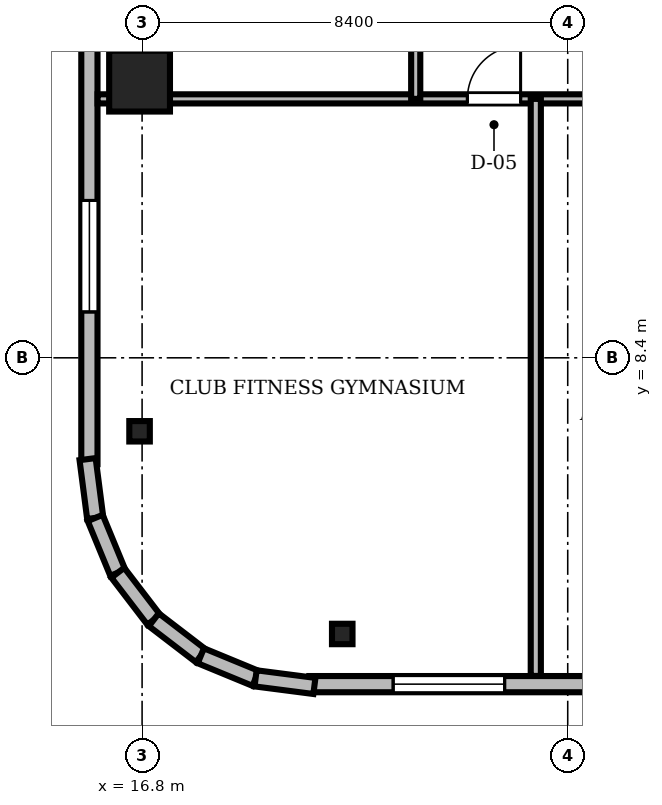
"""IFC4 building model, lengths in metres.
Left out: names, types, materials, properties, quantities, classifications, styles, units other than length and angle.
Written with IfcOpenShell. Run it as: python <this file> out.ifc"""

import sys

from ifc_helpers import new_model, si_unit, direction, frame, frame_2d, origin, origin_2d, place, context, subcontext, project, spatial, rectangle, i_section, extrude, source, transform, mapped, element, fill, save


model = new_model("IFC4")
c1 = context("Model", 3, precision=1e-05, world=origin(), true_north=direction((0.0, 1.0)))
c2 = subcontext(c1, "Body", "Model", "MODEL_VIEW")
j1 = project(units=[si_unit("LENGTHUNIT", "METRE"), si_unit("PLANEANGLEUNIT", "RADIAN")], contexts=[c1])
p1 = place(None, origin())
s1 = spatial("IfcSite", under=j1, at=p1, CompositionType="ELEMENT")
p2 = place(p1, origin())
s2 = spatial("IfcBuilding", under=s1, at=p2, CompositionType="ELEMENT")
p3 = place(p2, frame((0.0, 0.0, 246.65)))
s3 = spatial("IfcBuildingStorey", under=s2, at=p3, CompositionType="ELEMENT", Elevation=246.65)
m1 = source(origin(), c2, "Body", "SweptSolid", [
    extrude(rectangle(XDim=1.2, YDim=1.2, at=origin_2d()), origin(), (0.0, 0.0, 1.0), 3.73),
])
p4 = place(p3, frame((16.75, 13.86, 0.0), z_axis=(0.0, 0.0, 1.0), x_axis=(1.0, 0.0, 0.0)))
e1 = element("IfcColumn", 1, at=p4, inside=s3, PredefinedType="COLUMN", context=c2, shape_type="MappedRepresentation", body=[
    mapped(m1, transform((0.0, 0.0, 0.0), scale=1.0)),
])
m2 = source(origin(), c2, "Body", "SweptSolid", [
    extrude(i_section(OverallWidth=0.405, OverallDepth=0.403, WebThickness=0.018, FlangeThickness=0.028, FilletRadius=0.015, at=origin_2d()), origin(), (0.0, 0.0, 1.0), 3.73),
])
for number, where, z_axis, x_axis in (
    (2, (20.75, 2.95, 0.0), (0.0, 0.0, 1.0), (1.0, 0.0, 0.0)),
    (3, (16.75, 6.95, 0.0), (0.0, 0.0, 1.0), (1.0, 0.0, 0.0)),
):
    element("IfcColumn", number, at=place(p3, frame(where, z_axis=z_axis, x_axis=x_axis)), inside=s3, PredefinedType="COLUMN", context=c2, shape_type="MappedRepresentation", body=[
        mapped(m2, transform((0.0, 0.0, 0.0), scale=1.0)),
    ])
m3 = source(origin(), c2, "Body", "SweptSolid", [
    extrude(rectangle(XDim=15.6, YDim=0.32, at=frame_2d((7.8, 0.0))), origin(), (0.0, 0.0, 1.0), 3.73),
])
p5 = place(p3, frame((20.1, 1.96, 0.0), z_axis=(0.0, 0.0, 1.0), x_axis=(1.0, 0.0, 0.0)))
e4 = element("IfcWall", 4, at=p5, inside=s3, PredefinedType="SOLIDWALL", context=c2, shape_type="MappedRepresentation", body=[
    mapped(m3, transform((0.0, 0.0, 0.0), scale=1.0)),
])
m4 = source(origin(), c2, "Body", "SweptSolid", [
    extrude(rectangle(XDim=1.4, YDim=2.3, at=frame_2d((0.7, 1.15))), frame((0.0, 0.17, 0.0), z_axis=(0.0, -1.0, 0.0), x_axis=(1.0, 0.0, 0.0)), (0.0, 0.0, 1.0), 0.34),
])
p6 = place(p5, frame((9.61, 0.0, 0.0)))
e5 = element("IfcOpeningElement", 5, at=p6, cuts=e4, PredefinedType="OPENING", context=c2, shape_type="MappedRepresentation", body=[
    mapped(m4, transform((0.0, 0.0, 0.0), scale=1.0)),
])
m5 = source(origin(), c2, "Body", "SweptSolid", [
    extrude(rectangle(XDim=2.2, YDim=2.4, at=frame_2d((1.1, 1.2))), frame((0.0, 0.17, 0.0), z_axis=(0.0, -1.0, 0.0), x_axis=(1.0, 0.0, 0.0)), (0.0, 0.0, 1.0), 0.34),
])
p7 = place(p5, frame((1.655, 0.0, 0.72)))
e6 = element("IfcOpeningElement", 6, at=p7, cuts=e4, PredefinedType="OPENING", context=c2, shape_type="MappedRepresentation", body=[
    mapped(m5, transform((0.0, 0.0, 0.0), scale=1.0)),
])
p8 = place(p3, frame((15.76, 21.9, 0.0), z_axis=(0.0, 0.0, 1.0), x_axis=(0.0, -1.0, 0.0)))
e7 = element("IfcWall", 7, at=p8, inside=s3, PredefinedType="SOLIDWALL", context=c2, shape_type="MappedRepresentation", body=[
    mapped(m3, transform((0.0, 0.0, 0.0), scale=1.0)),
])
p9 = place(p8, frame((10.395, 0.0, 0.72)))
e8 = element("IfcOpeningElement", 8, at=p9, cuts=e7, PredefinedType="OPENING", context=c2, shape_type="MappedRepresentation", body=[
    mapped(m5, transform((0.0, 0.0, 0.0), scale=1.0)),
])
m6 = source(origin(), c2, "Body", "SweptSolid", [
    extrude(rectangle(XDim=1.171, YDim=0.32, at=frame_2d((0.585, 0.0))), origin(), (0.0, 0.0, 1.0), 3.73),
])
p10 = place(p3, frame((15.724, 6.401, 0.0), z_axis=(0.0, 0.0, 1.0), x_axis=(0.128269133229, -0.991739395941, 0.0)))
e9 = element("IfcWall", 9, at=p10, inside=s3, PredefinedType="SOLIDWALL", context=c2, shape_type="MappedRepresentation", body=[
    mapped(m6, transform((0.0, 0.0, 0.0), scale=1.0)),
])
m7 = source(origin(), c2, "Body", "SweptSolid", [
    extrude(rectangle(XDim=1.169, YDim=0.32, at=frame_2d((0.584, 0.0))), origin(), (0.0, 0.0, 1.0), 3.73),
])
for number, where, z_axis, x_axis in (
    (10, (15.875, 5.24, 0.0), (0.0, 0.0, 1.0), (0.381, -0.925, 0.0)),
    (11, (16.32, 4.159, 0.0), (0.0, 0.0, 1.0), (0.608, -0.794, 0.0)),
):
    element("IfcWall", number, at=place(p3, frame(where, z_axis=z_axis, x_axis=x_axis)), inside=s3, PredefinedType="SOLIDWALL", context=c2, shape_type="MappedRepresentation", body=[
        mapped(m7, transform((0.0, 0.0, 0.0), scale=1.0)),
    ])
m8 = source(origin(), c2, "Body", "SweptSolid", [
    extrude(rectangle(XDim=1.169, YDim=0.32, at=frame_2d((0.584, 0.0))), origin(), (0.0, 0.0, 1.0), 3.73),
])
p11 = place(p3, frame((17.031, 3.231, 0.0), z_axis=(0.0, 0.0, 1.0), x_axis=(0.793663520347, -0.608356981114, 0.0)))
e12 = element("IfcWall", 12, at=p11, inside=s3, PredefinedType="SOLIDWALL", context=c2, shape_type="MappedRepresentation", body=[
    mapped(m8, transform((0.0, 0.0, 0.0), scale=1.0)),
])
m9 = source(origin(), c2, "Body", "SweptSolid", [
    extrude(rectangle(XDim=1.169, YDim=0.32, at=frame_2d((0.585, 0.0))), origin(), (0.0, 0.0, 1.0), 3.73),
])
p12 = place(p3, frame((17.959, 2.52, 0.0), z_axis=(0.0, 0.0, 1.0), x_axis=(0.924479075121, -0.381232789334, 0.0)))
e13 = element("IfcWall", 13, at=p12, inside=s3, PredefinedType="SOLIDWALL", context=c2, shape_type="MappedRepresentation", body=[
    mapped(m9, transform((0.0, 0.0, 0.0), scale=1.0)),
])
m10 = source(origin(), c2, "Body", "SweptSolid", [
    extrude(rectangle(XDim=1.17, YDim=0.32, at=frame_2d((0.585, 0.0))), origin(), (0.0, 0.0, 1.0), 3.73),
])
p13 = place(p3, frame((19.04, 2.074, 0.0), z_axis=(0.0, 0.0, 1.0), x_axis=(0.991762485493, -0.128090485085, 0.0)))
e14 = element("IfcWall", 14, at=p13, inside=s3, PredefinedType="SOLIDWALL", context=c2, shape_type="MappedRepresentation", body=[
    mapped(m10, transform((0.0, 0.0, 0.0), scale=1.0)),
])
m11 = source(origin(), c2, "Body", "SweptSolid", [
    extrude(rectangle(XDim=46.156, YDim=0.18, at=frame_2d((23.078, 0.0))), origin(), (0.0, 0.0, 1.0), 2.972),
])
p14 = place(p3, frame((15.922, 13.51, 0.0), z_axis=(0.0, 0.0, 1.0), x_axis=(1.0, 0.0, 0.0)))
e15 = element("IfcWall", 15, at=p14, inside=s3, PredefinedType="PARTITIONING", context=c2, shape_type="MappedRepresentation", body=[
    mapped(m11, transform((0.0, 0.0, 0.0), scale=1.0)),
])
m12 = source(origin(), c2, "Body", "SweptSolid", [
    extrude(rectangle(XDim=1.05, YDim=2.2, at=frame_2d((0.525, 1.1))), frame((0.0, 0.1, 0.0), z_axis=(0.0, -1.0, 0.0), x_axis=(1.0, 0.0, 0.0)), (0.0, 0.0, 1.0), 0.2),
])
p15 = place(p14, frame((7.298, 0.0, 0.0)))
e16 = element("IfcOpeningElement", 16, at=p15, cuts=e15, PredefinedType="OPENING", context=c2, shape_type="MappedRepresentation", body=[
    mapped(m12, transform((0.0, 0.0, 0.0), scale=1.0)),
])
p16 = place(p14, frame((10.384, 0.0, 0.0)))
e17 = element("IfcOpeningElement", 17, at=p16, cuts=e15, PredefinedType="OPENING", context=c2, shape_type="MappedRepresentation", body=[
    mapped(m12, transform((0.0, 0.0, 0.0), scale=1.0)),
])
p17 = place(p14, frame((15.647, 0.0, 0.0)))
e18 = element("IfcOpeningElement", 18, at=p17, cuts=e15, PredefinedType="OPENING", context=c2, shape_type="MappedRepresentation", body=[
    mapped(m12, transform((0.0, 0.0, 0.0), scale=1.0)),
])
p18 = place(p14, frame((21.659, 0.0, 0.0)))
e19 = element("IfcOpeningElement", 19, at=p18, cuts=e15, PredefinedType="OPENING", context=c2, shape_type="MappedRepresentation", body=[
    mapped(m12, transform((0.0, 0.0, 0.0), scale=1.0)),
])
p19 = place(p14, frame((28.422, 0.0, 0.0)))
e20 = element("IfcOpeningElement", 20, at=p19, cuts=e15, PredefinedType="OPENING", context=c2, shape_type="MappedRepresentation", body=[
    mapped(m12, transform((0.0, 0.0, 0.0), scale=1.0)),
])
p20 = place(p14, frame((33.798, 0.0, 0.0)))
e21 = element("IfcOpeningElement", 21, at=p20, cuts=e15, PredefinedType="OPENING", context=c2, shape_type="MappedRepresentation", body=[
    mapped(m12, transform((0.0, 0.0, 0.0), scale=1.0)),
])
m13 = source(origin(), c2, "Body", "SweptSolid", [
    extrude(rectangle(XDim=15.04, YDim=0.18, at=frame_2d((7.52, 0.0))), origin(), (0.0, 0.0, 1.0), 3.172),
])
p21 = place(p3, frame((22.2, 13.51, 0.0), z_axis=(0.0, 0.0, 1.0), x_axis=(0.0, 1.0, 0.0)))
e22 = element("IfcWall", 22, at=p21, inside=s3, PredefinedType="PARTITIONING", context=c2, shape_type="MappedRepresentation", body=[
    mapped(m13, transform((0.0, 0.0, 0.0), scale=1.0)),
])
m14 = source(origin(), c2, "Body", "SweptSolid", [
    extrude(rectangle(XDim=11.388, YDim=0.2, at=frame_2d((5.694, 0.0))), origin(), (0.0, 0.0, 1.0), 2.972),
])
p22 = place(p3, frame((24.57, 2.122, 0.0), z_axis=(0.0, 0.0, 1.0), x_axis=(0.0, 1.0, 0.0)))
e23 = element("IfcWall", 23, at=p22, inside=s3, PredefinedType="PARTITIONING", context=c2, shape_type="MappedRepresentation", body=[
    mapped(m14, transform((0.0, 0.0, 0.0), scale=1.0)),
])
m15 = source(origin(), c2, "Body", "SweptSolid", [
    extrude(rectangle(XDim=2.2, YDim=2.4, at=frame_2d((1.1, 1.2))), frame((0.0, 0.03, 0.0), z_axis=(0.0, -1.0, 0.0), x_axis=(1.0, 0.0, 0.0)), (0.0, 0.0, 1.0), 0.06),
])
p23 = place(p7, origin())
e24 = element("IfcWindow", 24, at=p23, inside=s3, PartitioningType="SINGLE_PANEL", PredefinedType="WINDOW", context=c2, shape_type="MappedRepresentation", body=[
    mapped(m15, transform((0.0, 0.0, 0.0), scale=1.0)),
])
fill(e6, e24)
p24 = place(p9, origin())
e25 = element("IfcWindow", 25, at=p24, inside=s3, PartitioningType="SINGLE_PANEL", PredefinedType="WINDOW", context=c2, shape_type="MappedRepresentation", body=[
    mapped(m15, transform((0.0, 0.0, 0.0), scale=1.0)),
])
fill(e8, e25)
m16 = source(origin(), c2, "Body", "SweptSolid", [
    extrude(rectangle(XDim=1.05, YDim=2.2, at=frame_2d((0.525, 1.1))), frame((0.0, 0.025, 0.0), z_axis=(0.0, -1.0, 0.0), x_axis=(1.0, 0.0, 0.0)), (0.0, 0.0, 1.0), 0.05),
])
p25 = place(p15, origin())
e26 = element("IfcDoor", 26, at=p25, inside=s3, OperationType="SINGLE_SWING_RIGHT", PredefinedType="DOOR", context=c2, shape_type="MappedRepresentation", body=[
    mapped(m16, transform((0.0, 0.0, 0.0), scale=1.0)),
])
fill(e16, e26)
save(model, sys.argv[1])
